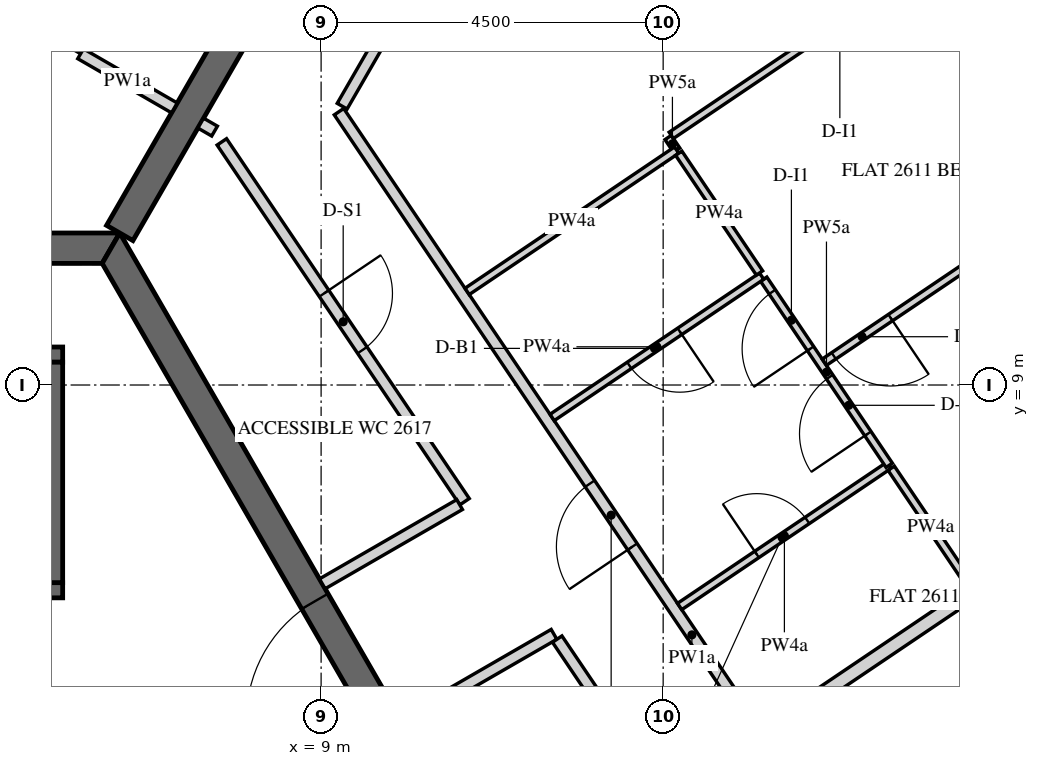
"""IFC4 building model, lengths in metres.
Left out: names, types, materials, properties, quantities, classifications, styles, units other than length and angle.
Written with IfcOpenShell. Run it as: python <this file> out.ifc"""

import sys

from ifc_helpers import new_model, si_unit, direction, frame, frame_2d, origin, place, context, subcontext, project, spatial, polyline, rectangle, outline, extrude, element, fill, save


model = new_model("IFC4")
c1 = context("Model", 3, precision=1e-05, world=origin(), true_north=direction((0.0, 1.0)))
c2 = subcontext(c1, "Body", "Model", "MODEL_VIEW")
j1 = project(units=[si_unit("LENGTHUNIT", "METRE"), si_unit("PLANEANGLEUNIT", "RADIAN")], contexts=[c1])
p1 = place(None, origin())
s1 = spatial("IfcSite", under=j1, at=p1, CompositionType="ELEMENT")
p2 = place(p1, origin())
s2 = spatial("IfcBuilding", under=s1, at=p2, CompositionType="ELEMENT")
p3 = place(p2, frame((0.0, 0.0, 334.2)))
s3 = spatial("IfcBuildingStorey", under=s2, at=p3, CompositionType="ELEMENT", Elevation=334.2)
p4 = place(p3, frame((26.706, 2.879, -0.15), z_axis=(0.0, 0.0, 1.0), x_axis=(-0.559197891507, 0.829034208061, 0.0)))
e1 = element("IfcWall", 1, at=p4, inside=s3, PredefinedType="SOLIDWALL", context=c2, shape_type="SweptSolid", body=[
    extrude(outline(polyline([(0.25, -0.25), (22.795, -0.25), (23.295, 0.25), (-0.25, 0.25), (0.25, -0.25)])), origin(), (0.0, 0.0, 1.0), 3.75),
])
p5 = place(p4, frame((1.323, 0.0, 1.05)))
e2 = element("IfcOpeningElement", 2, at=p5, cuts=e1, PredefinedType="OPENING", context=c2, shape_type="SweptSolid", body=[
    extrude(rectangle(XDim=0.9, YDim=1.5, at=frame_2d((0.45, 0.75))), frame((0.0, 0.26, 0.0), z_axis=(0.0, -1.0, 0.0), x_axis=(1.0, 0.0, 0.0)), (0.0, 0.0, 1.0), 0.52),
])
p6 = place(p4, frame((2.522, 0.0, 0.15)))
e3 = element("IfcOpeningElement", 3, at=p6, cuts=e1, PredefinedType="OPENING", context=c2, shape_type="SweptSolid", body=[
    extrude(rectangle(XDim=1.2, YDim=2.4, at=frame_2d((0.6, 1.2))), frame((0.0, 0.26, 0.0), z_axis=(0.0, -1.0, 0.0), x_axis=(1.0, 0.0, 0.0)), (0.0, 0.0, 1.0), 0.52),
])
p7 = place(p4, frame((4.922, 0.0, 1.05)))
e4 = element("IfcOpeningElement", 4, at=p7, cuts=e1, PredefinedType="OPENING", context=c2, shape_type="SweptSolid", body=[
    extrude(rectangle(XDim=0.9, YDim=1.5, at=frame_2d((0.45, 0.75))), frame((0.0, 0.26, 0.0), z_axis=(0.0, -1.0, 0.0), x_axis=(1.0, 0.0, 0.0)), (0.0, 0.0, 1.0), 0.52),
])
p8 = place(p4, frame((6.122, 0.0, 0.15)))
e5 = element("IfcOpeningElement", 5, at=p8, cuts=e1, PredefinedType="OPENING", context=c2, shape_type="SweptSolid", body=[
    extrude(rectangle(XDim=1.2, YDim=2.4, at=frame_2d((0.6, 1.2))), frame((0.0, 0.26, 0.0), z_axis=(0.0, -1.0, 0.0), x_axis=(1.0, 0.0, 0.0)), (0.0, 0.0, 1.0), 0.52),
])
p9 = place(p4, frame((8.522, 0.0, 1.05)))
e6 = element("IfcOpeningElement", 6, at=p9, cuts=e1, PredefinedType="OPENING", context=c2, shape_type="SweptSolid", body=[
    extrude(rectangle(XDim=0.9, YDim=1.5, at=frame_2d((0.45, 0.75))), frame((0.0, 0.26, 0.0), z_axis=(0.0, -1.0, 0.0), x_axis=(1.0, 0.0, 0.0)), (0.0, 0.0, 1.0), 0.52),
])
p10 = place(p4, frame((9.722, 0.0, 0.15)))
e7 = element("IfcOpeningElement", 7, at=p10, cuts=e1, PredefinedType="OPENING", context=c2, shape_type="SweptSolid", body=[
    extrude(rectangle(XDim=1.2, YDim=2.4, at=frame_2d((0.6, 1.2))), frame((0.0, 0.26, 0.0), z_axis=(0.0, -1.0, 0.0), x_axis=(1.0, 0.0, 0.0)), (0.0, 0.0, 1.0), 0.52),
])
p11 = place(p4, frame((12.122, 0.0, 1.05)))
e8 = element("IfcOpeningElement", 8, at=p11, cuts=e1, PredefinedType="OPENING", context=c2, shape_type="SweptSolid", body=[
    extrude(rectangle(XDim=0.9, YDim=1.5, at=frame_2d((0.45, 0.75))), frame((0.0, 0.26, 0.0), z_axis=(0.0, -1.0, 0.0), x_axis=(1.0, 0.0, 0.0)), (0.0, 0.0, 1.0), 0.52),
])
p12 = place(p4, frame((13.323, 0.0, 0.15)))
e9 = element("IfcOpeningElement", 9, at=p12, cuts=e1, PredefinedType="OPENING", context=c2, shape_type="SweptSolid", body=[
    extrude(rectangle(XDim=1.2, YDim=2.4, at=frame_2d((0.6, 1.2))), frame((0.0, 0.26, 0.0), z_axis=(0.0, -1.0, 0.0), x_axis=(1.0, 0.0, 0.0)), (0.0, 0.0, 1.0), 0.52),
])
p13 = place(p4, frame((15.722, 0.0, 1.05)))
e10 = element("IfcOpeningElement", 10, at=p13, cuts=e1, PredefinedType="OPENING", context=c2, shape_type="SweptSolid", body=[
    extrude(rectangle(XDim=0.9, YDim=1.5, at=frame_2d((0.45, 0.75))), frame((0.0, 0.26, 0.0), z_axis=(0.0, -1.0, 0.0), x_axis=(1.0, 0.0, 0.0)), (0.0, 0.0, 1.0), 0.52),
])
p14 = place(p4, frame((16.922, 0.0, 0.15)))
e11 = element("IfcOpeningElement", 11, at=p14, cuts=e1, PredefinedType="OPENING", context=c2, shape_type="SweptSolid", body=[
    extrude(rectangle(XDim=1.2, YDim=2.4, at=frame_2d((0.6, 1.2))), frame((0.0, 0.26, 0.0), z_axis=(0.0, -1.0, 0.0), x_axis=(1.0, 0.0, 0.0)), (0.0, 0.0, 1.0), 0.52),
])
p15 = place(p4, frame((19.323, 0.0, 1.05)))
e12 = element("IfcOpeningElement", 12, at=p15, cuts=e1, PredefinedType="OPENING", context=c2, shape_type="SweptSolid", body=[
    extrude(rectangle(XDim=0.9, YDim=1.5, at=frame_2d((0.45, 0.75))), frame((0.0, 0.26, 0.0), z_axis=(0.0, -1.0, 0.0), x_axis=(1.0, 0.0, 0.0)), (0.0, 0.0, 1.0), 0.52),
])
p16 = place(p4, frame((20.522, 0.0, 0.15)))
e13 = element("IfcOpeningElement", 13, at=p16, cuts=e1, PredefinedType="OPENING", context=c2, shape_type="SweptSolid", body=[
    extrude(rectangle(XDim=1.2, YDim=2.4, at=frame_2d((0.6, 1.2))), frame((0.0, 0.26, 0.0), z_axis=(0.0, -1.0, 0.0), x_axis=(1.0, 0.0, 0.0)), (0.0, 0.0, 1.0), 0.52),
])
p17 = place(p3, frame((12.471, 0.0, -0.15), z_axis=(0.0, 0.0, 1.0), x_axis=(-0.499996419489, 0.866027470984, 0.0)))
e14 = element("IfcWall", 14, at=p17, inside=s3, PredefinedType="SHEAR", context=c2, shape_type="SweptSolid", body=[
    extrude(outline(polyline([(-0.115, -0.2), (12.586, -0.2), (12.355, 0.2), (0.115, 0.2), (-0.115, -0.2)])), origin(), (0.0, 0.0, 1.0), 3.75),
])
p18 = place(p17, frame((5.306, 0.0, 0.15)))
e15 = element("IfcOpeningElement", 15, at=p18, cuts=e14, PredefinedType="OPENING", context=c2, shape_type="SweptSolid", body=[
    extrude(rectangle(XDim=1.8, YDim=2.4, at=frame_2d((0.9, 1.2))), frame((0.0, 0.21, 0.0), z_axis=(0.0, -1.0, 0.0), x_axis=(1.0, 0.0, 0.0)), (0.0, 0.0, 1.0), 0.42),
])
p19 = place(p3, frame((6.235, 10.8, -0.15), z_axis=(0.0, 0.0, 1.0), x_axis=(-1.0, 0.0, 0.0)))
e16 = element("IfcWall", 16, at=p19, inside=s3, PredefinedType="SHEAR", context=c2, shape_type="SweptSolid", body=[
    extrude(outline(polyline([(-0.115, -0.2), (12.586, -0.2), (12.355, 0.2), (0.115, 0.2), (-0.115, -0.2)])), origin(), (0.0, 0.0, 1.0), 3.75),
])
p20 = place(p3, frame((6.351, 11.0, -0.15), z_axis=(0.0, 0.0, 1.0), x_axis=(0.499998894578, 0.866026041999, 0.0)))
e17 = element("IfcWall", 17, at=p20, inside=s3, PredefinedType="SHEAR", context=c2, shape_type="SweptSolid", body=[
    extrude(rectangle(XDim=15.544, YDim=0.4, at=frame_2d((7.772, 0.0))), origin(), (0.0, 0.0, 1.0), 3.75),
])
p21 = place(p20, frame((6.872, 0.0, 0.15)))
e18 = element("IfcOpeningElement", 18, at=p21, cuts=e17, PredefinedType="OPENING", context=c2, shape_type="SweptSolid", body=[
    extrude(rectangle(XDim=1.8, YDim=2.4, at=frame_2d((0.9, 1.2))), frame((0.0, 0.21, 0.0), z_axis=(0.0, -1.0, 0.0), x_axis=(1.0, 0.0, 0.0)), (0.0, 0.0, 1.0), 0.42),
])
p22 = place(p3, frame((-5.6, 6.3, -0.25), z_axis=(0.0, 0.0, 1.0), x_axis=(1.0, 0.0, 0.0)))
e19 = element("IfcWall", 19, at=p22, inside=s3, PredefinedType="SHEAR", context=c2, shape_type="SweptSolid", body=[
    extrude(rectangle(XDim=11.2, YDim=0.2, at=frame_2d((5.6, 0.0))), origin(), (0.0, 0.0, 1.0), 3.9),
])
p23 = place(p22, frame((8.45, 0.0, 0.25)))
e20 = element("IfcOpeningElement", 20, at=p23, cuts=e19, PredefinedType="OPENING", context=c2, shape_type="SweptSolid", body=[
    extrude(rectangle(XDim=0.9, YDim=2.1, at=frame_2d((0.45, 1.05))), frame((0.0, 0.11, 0.0), z_axis=(0.0, -1.0, 0.0), x_axis=(1.0, 0.0, 0.0)), (0.0, 0.0, 1.0), 0.22),
])
p24 = place(p22, frame((0.65, 0.0, 0.25)))
e21 = element("IfcOpeningElement", 21, at=p24, cuts=e19, PredefinedType="OPENING", context=c2, shape_type="SweptSolid", body=[
    extrude(rectangle(XDim=1.1, YDim=2.1, at=frame_2d((0.55, 1.05))), frame((0.0, 0.11, 0.0), z_axis=(0.0, -1.0, 0.0), x_axis=(1.0, 0.0, 0.0)), (0.0, 0.0, 1.0), 0.22),
])
p25 = place(p22, frame((2.85, 0.0, 0.25)))
e22 = element("IfcOpeningElement", 22, at=p25, cuts=e19, PredefinedType="OPENING", context=c2, shape_type="SweptSolid", body=[
    extrude(rectangle(XDim=1.1, YDim=2.1, at=frame_2d((0.55, 1.05))), frame((0.0, 0.11, 0.0), z_axis=(0.0, -1.0, 0.0), x_axis=(1.0, 0.0, 0.0)), (0.0, 0.0, 1.0), 0.22),
])
p26 = place(p22, frame((5.05, 0.0, 0.25)))
e23 = element("IfcOpeningElement", 23, at=p26, cuts=e19, PredefinedType="OPENING", context=c2, shape_type="SweptSolid", body=[
    extrude(rectangle(XDim=1.1, YDim=2.1, at=frame_2d((0.55, 1.05))), frame((0.0, 0.11, 0.0), z_axis=(0.0, -1.0, 0.0), x_axis=(1.0, 0.0, 0.0)), (0.0, 0.0, 1.0), 0.22),
])
p27 = place(p3, frame((-5.6, 9.4, -0.25), z_axis=(0.0, 0.0, 1.0), x_axis=(1.0, 0.0, 0.0)))
e24 = element("IfcWall", 24, at=p27, inside=s3, PredefinedType="SHEAR", context=c2, shape_type="SweptSolid", body=[
    extrude(rectangle(XDim=11.2, YDim=0.2, at=frame_2d((5.6, 0.0))), origin(), (0.0, 0.0, 1.0), 3.9),
])
p28 = place(p3, frame((5.5, 6.4, -0.25), z_axis=(0.0, 0.0, 1.0), x_axis=(0.0, 1.0, 0.0)))
e25 = element("IfcWall", 25, at=p28, inside=s3, PredefinedType="SHEAR", context=c2, shape_type="SweptSolid", body=[
    extrude(rectangle(XDim=2.9, YDim=0.2, at=frame_2d((1.45, 0.0))), origin(), (0.0, 0.0, 1.0), 3.9),
])
p29 = place(p3, frame((6.244, 14.215, 0.0), z_axis=(0.0, 0.0, 1.0), x_axis=(-0.499998034377, -0.866026538634, 0.0)))
e26 = element("IfcWall", 26, at=p29, inside=s3, PredefinedType="PARTITIONING", context=c2, shape_type="SweptSolid", body=[
    extrude(rectangle(XDim=0.946, YDim=0.15, at=frame_2d((0.473, 0.0))), origin(), (0.0, 0.0, 1.0), 2.838),
])
p30 = place(p3, frame((5.836, 13.358, 0.0), z_axis=(0.0, 0.0, 1.0), x_axis=(0.865988727248, -0.500063520245, 0.0)))
e27 = element("IfcWall", 27, at=p30, inside=s3, PredefinedType="PARTITIONING", context=c2, shape_type="SweptSolid", body=[
    extrude(rectangle(XDim=1.425, YDim=0.15, at=frame_2d((0.712, 0.0))), origin(), (0.0, 0.0, 1.0), 2.838),
])
p31 = place(p3, frame((18.521, -1.171, 0.0), z_axis=(0.0, 0.0, 1.0), x_axis=(-0.559191021435, 0.829038842001, 0.0)))
e28 = element("IfcWall", 28, at=p31, inside=s3, PredefinedType="PARTITIONING", context=c2, shape_type="SweptSolid", body=[
    extrude(rectangle(XDim=16.605, YDim=0.15, at=frame_2d((8.303, 0.0))), origin(), (0.0, 0.0, 1.0), 2.838),
])
p32 = place(p31, frame((9.703, 0.0, 0.0)))
e29 = element("IfcOpeningElement", 29, at=p32, cuts=e28, PredefinedType="OPENING", context=c2, shape_type="SweptSolid", body=[
    extrude(rectangle(XDim=1.0, YDim=2.1, at=frame_2d((0.5, 1.05))), frame((0.0, 0.085, 0.0), z_axis=(0.0, -1.0, 0.0), x_axis=(1.0, 0.0, 0.0)), (0.0, 0.0, 1.0), 0.17),
])
p33 = place(p3, frame((9.277, 12.668, 0.0), z_axis=(0.0, 0.0, 1.0), x_axis=(0.499991012162, 0.866030592853, 0.0)))
e30 = element("IfcWall", 30, at=p33, inside=s3, PredefinedType="PARTITIONING", context=c2, shape_type="SweptSolid", body=[
    extrude(rectangle(XDim=7.764, YDim=0.15, at=frame_2d((3.882, 0.0))), origin(), (0.0, 0.0, 1.0), 2.838),
])
p34 = place(p3, frame((10.066, 4.566, 0.0), z_axis=(0.0, 0.0, 1.0), x_axis=(0.866034075723, 0.499984979461, 0.0)))
e31 = element("IfcWall", 31, at=p34, inside=s3, PredefinedType="PARTITIONING", context=c2, shape_type="SweptSolid", body=[
    extrude(rectangle(XDim=2.308, YDim=0.15, at=frame_2d((1.154, 0.0))), origin(), (0.0, 0.0, 1.0), 2.838),
])
p35 = place(p3, frame((12.106, 5.657, 0.0), z_axis=(0.0, 0.0, 1.0), x_axis=(0.559202573837, -0.829031049728, 0.0)))
e32 = element("IfcWall", 32, at=p35, inside=s3, PredefinedType="PARTITIONING", context=c2, shape_type="SweptSolid", body=[
    extrude(rectangle(XDim=8.394, YDim=0.15, at=frame_2d((4.197, 0.0))), origin(), (0.0, 0.0, 1.0), 2.838),
])
p36 = place(p35, frame((3.747, 0.0, 0.0)))
e33 = element("IfcOpeningElement", 33, at=p36, cuts=e32, PredefinedType="OPENING", context=c2, shape_type="SweptSolid", body=[
    extrude(rectangle(XDim=0.9, YDim=2.1, at=frame_2d((0.45, 1.05))), frame((0.0, 0.085, 0.0), z_axis=(0.0, -1.0, 0.0), x_axis=(1.0, 0.0, 0.0)), (0.0, 0.0, 1.0), 0.17),
])
p37 = place(p3, frame((7.416, 12.446, 0.0), z_axis=(0.0, 0.0, 1.0), x_axis=(0.866378867349, -0.499387282788, 0.0)))
e34 = element("IfcWall", 34, at=p37, inside=s3, PredefinedType="PARTITIONING", context=c2, shape_type="SweptSolid", body=[
    extrude(rectangle(XDim=0.21, YDim=0.15, at=frame_2d((0.105, 0.0))), origin(), (0.0, 0.0, 1.0), 2.838),
])
p38 = place(p3, frame((7.694, 12.199, 0.0), z_axis=(0.0, 0.0, 1.0), x_axis=(0.55920112739, -0.829032025392, 0.0)))
e35 = element("IfcWall", 35, at=p38, inside=s3, PredefinedType="PARTITIONING", context=c2, shape_type="SweptSolid", body=[
    extrude(rectangle(XDim=5.71, YDim=0.15, at=frame_2d((2.855, 0.0))), origin(), (0.0, 0.0, 1.0), 2.838),
])
p39 = place(p38, frame((2.405, 0.0, 0.0)))
e36 = element("IfcOpeningElement", 36, at=p39, cuts=e35, PredefinedType="OPENING", context=c2, shape_type="SweptSolid", body=[
    extrude(rectangle(XDim=0.9, YDim=2.1, at=frame_2d((0.45, 1.05))), frame((0.0, 0.085, 0.0), z_axis=(0.0, -1.0, 0.0), x_axis=(1.0, 0.0, 0.0)), (0.0, 0.0, 1.0), 0.17),
])
p40 = place(p3, frame((10.822, 7.427, 0.0), z_axis=(0.0, 0.0, 1.0), x_axis=(-0.866016009309, -0.500016271356, 0.0)))
e37 = element("IfcWall", 37, at=p40, inside=s3, PredefinedType="PARTITIONING", context=c2, shape_type="SweptSolid", body=[
    extrude(rectangle(XDim=2.086, YDim=0.15, at=frame_2d((1.043, 0.0))), origin(), (0.0, 0.0, 1.0), 2.838),
])
p41 = place(p3, frame((22.069, 9.307, 0.0), z_axis=(0.0, 0.0, 1.0), x_axis=(-0.829040270775, -0.559188903174, 0.0)))
e38 = element("IfcWall", 38, at=p41, inside=s3, PredefinedType="PARTITIONING", context=c2, shape_type="SweptSolid", body=[
    extrude(rectangle(XDim=8.758, YDim=0.18, at=frame_2d((4.379, 0.0))), origin(), (0.0, 0.0, 1.0), 2.838),
])
p42 = place(p3, frame((13.678, 12.089, 0.0), z_axis=(0.0, 0.0, 1.0), x_axis=(-0.559431350648, 0.828876688001, 0.0)))
e39 = element("IfcWall", 39, at=p42, inside=s3, PredefinedType="PARTITIONING", context=c2, shape_type="SweptSolid", body=[
    extrude(rectangle(XDim=0.202, YDim=0.1, at=frame_2d((0.101, 0.0))), origin(), (0.0, 0.0, 1.0), 2.838),
])
p43 = place(p3, frame((13.607, 12.284, 0.0), z_axis=(0.0, 0.0, 1.0), x_axis=(0.829033261565, 0.559199294722, 0.0)))
e40 = element("IfcWall", 40, at=p43, inside=s3, PredefinedType="PARTITIONING", context=c2, shape_type="SweptSolid", body=[
    extrude(rectangle(XDim=5.35, YDim=0.1, at=frame_2d((2.675, 0.0))), origin(), (0.0, 0.0, 1.0), 2.838),
])
p44 = place(p43, frame((2.225, 0.0, 0.0)))
e41 = element("IfcOpeningElement", 41, at=p44, cuts=e40, PredefinedType="OPENING", context=c2, shape_type="SweptSolid", body=[
    extrude(rectangle(XDim=0.9, YDim=2.1, at=frame_2d((0.45, 1.05))), frame((0.0, 0.06, 0.0), z_axis=(0.0, -1.0, 0.0), x_axis=(1.0, 0.0, 0.0)), (0.0, 0.0, 1.0), 0.12),
])
p45 = place(p3, frame((10.921, 10.231, 0.0), z_axis=(0.0, 0.0, 1.0), x_axis=(0.829010378124, 0.559233218759, 0.0)))
e42 = element("IfcWall", 42, at=p45, inside=s3, PredefinedType="PARTITIONING", context=c2, shape_type="SweptSolid", body=[
    extrude(rectangle(XDim=3.325, YDim=0.1, at=frame_2d((1.663, 0.0))), origin(), (0.0, 0.0, 1.0), 2.838),
])
p46 = place(p3, frame((13.717, 6.086, 0.0), z_axis=(0.0, 0.0, 1.0), x_axis=(0.829067379225, 0.559148710725, 0.0)))
e43 = element("IfcWall", 43, at=p46, inside=s3, PredefinedType="PARTITIONING", context=c2, shape_type="SweptSolid", body=[
    extrude(rectangle(XDim=3.325, YDim=0.1, at=frame_2d((1.663, 0.0))), origin(), (0.0, 0.0, 1.0), 2.838),
])
p47 = place(p46, frame((1.225, 0.0, 0.0)))
e44 = element("IfcOpeningElement", 44, at=p47, cuts=e43, PredefinedType="OPENING", context=c2, shape_type="SweptSolid", body=[
    extrude(rectangle(XDim=0.8, YDim=2.1, at=frame_2d((0.4, 1.05))), frame((0.0, 0.06, 0.0), z_axis=(0.0, -1.0, 0.0), x_axis=(1.0, 0.0, 0.0)), (0.0, 0.0, 1.0), 0.12),
])
p48 = place(p3, frame((16.474, 7.944, 0.0), z_axis=(0.0, 0.0, 1.0), x_axis=(-0.559193191328, 0.829037378393, 0.0)))
e45 = element("IfcWall", 45, at=p48, inside=s3, PredefinedType="PARTITIONING", context=c2, shape_type="SweptSolid", body=[
    extrude(rectangle(XDim=2.954, YDim=0.1, at=frame_2d((1.477, 0.0))), origin(), (0.0, 0.0, 1.0), 2.838),
])
p49 = place(p48, frame((0.502, 0.0, 0.0)))
e46 = element("IfcOpeningElement", 46, at=p49, cuts=e45, PredefinedType="OPENING", context=c2, shape_type="SweptSolid", body=[
    extrude(rectangle(XDim=0.9, YDim=2.1, at=frame_2d((0.45, 1.05))), frame((0.0, 0.06, 0.0), z_axis=(0.0, -1.0, 0.0), x_axis=(1.0, 0.0, 0.0)), (0.0, 0.0, 1.0), 0.12),
])
p50 = place(p48, frame((1.852, 0.0, 0.0)))
e47 = element("IfcOpeningElement", 47, at=p50, cuts=e45, PredefinedType="OPENING", context=c2, shape_type="SweptSolid", body=[
    extrude(rectangle(XDim=0.9, YDim=2.1, at=frame_2d((0.45, 1.05))), frame((0.0, 0.06, 0.0), z_axis=(0.0, -1.0, 0.0), x_axis=(1.0, 0.0, 0.0)), (0.0, 0.0, 1.0), 0.12),
])
p51 = place(p3, frame((14.796, 10.433, 0.0), z_axis=(0.0, 0.0, 1.0), x_axis=(-0.82903334026, -0.559199178055, 0.0)))
e48 = element("IfcWall", 48, at=p51, inside=s3, PredefinedType="PARTITIONING", context=c2, shape_type="SweptSolid", body=[
    extrude(rectangle(XDim=3.325, YDim=0.1, at=frame_2d((1.663, 0.0))), origin(), (0.0, 0.0, 1.0), 2.838),
])
p52 = place(p51, frame((1.3, 0.0, 0.0)))
e49 = element("IfcOpeningElement", 49, at=p52, cuts=e48, PredefinedType="OPENING", context=c2, shape_type="SweptSolid", body=[
    extrude(rectangle(XDim=0.8, YDim=2.1, at=frame_2d((0.4, 1.05))), frame((0.0, 0.06, 0.0), z_axis=(0.0, -1.0, 0.0), x_axis=(1.0, 0.0, 0.0)), (0.0, 0.0, 1.0), 0.12),
])
p53 = place(p3, frame((17.541, 6.362, 0.0), z_axis=(0.0, 0.0, 1.0), x_axis=(-0.559110227504, 0.829093332201, 0.0)))
e50 = element("IfcWall", 50, at=p53, inside=s3, PredefinedType="PARTITIONING", context=c2, shape_type="SweptSolid", body=[
    extrude(rectangle(XDim=1.862, YDim=0.1, at=frame_2d((0.931, 0.0))), origin(), (0.0, 0.0, 1.0), 2.838),
])
p54 = place(p3, frame((20.055, 12.292, 0.0), z_axis=(0.0, 0.0, 1.0), x_axis=(-0.829033261565, -0.559199294722, 0.0)))
e51 = element("IfcWall", 51, at=p54, inside=s3, PredefinedType="PARTITIONING", context=c2, shape_type="SweptSolid", body=[
    extrude(rectangle(XDim=5.35, YDim=0.1, at=frame_2d((2.675, 0.0))), origin(), (0.0, 0.0, 1.0), 2.838),
])
p55 = place(p54, frame((4.3, 0.0, 0.0)))
e52 = element("IfcOpeningElement", 52, at=p55, cuts=e51, PredefinedType="OPENING", context=c2, shape_type="SweptSolid", body=[
    extrude(rectangle(XDim=0.9, YDim=2.1, at=frame_2d((0.45, 1.05))), frame((0.0, 0.06, 0.0), z_axis=(0.0, -1.0, 0.0), x_axis=(1.0, 0.0, 0.0)), (0.0, 0.0, 1.0), 0.12),
])
p56 = place(p3, frame((13.705, 12.049, 0.0), z_axis=(0.0, 0.0, 1.0), x_axis=(0.559199178055, -0.82903334026, 0.0)))
e53 = element("IfcWall", 53, at=p56, inside=s3, PredefinedType="PARTITIONING", context=c2, shape_type="SweptSolid", body=[
    extrude(rectangle(XDim=1.9, YDim=0.1, at=frame_2d((0.95, 0.0))), origin(), (0.0, 0.0, 1.0), 2.838),
])
p57 = place(p18, origin())
e54 = element("IfcDoor", 54, at=p57, inside=s3, OperationType="DOUBLE_DOOR_SINGLE_SWING", PredefinedType="DOOR", context=c2, shape_type="SweptSolid", body=[
    extrude(rectangle(XDim=1.8, YDim=2.4, at=frame_2d((0.9, 1.2))), frame((0.0, 0.025, 0.0), z_axis=(0.0, -1.0, 0.0), x_axis=(1.0, 0.0, 0.0)), (0.0, 0.0, 1.0), 0.05),
])
fill(e15, e54)
p58 = place(p32, origin())
e55 = element("IfcDoor", 55, at=p58, inside=s3, OperationType="SINGLE_SWING_RIGHT", PredefinedType="DOOR", context=c2, shape_type="SweptSolid", body=[
    extrude(rectangle(XDim=1.0, YDim=2.1, at=frame_2d((0.5, 1.05))), frame((0.0, 0.025, 0.0), z_axis=(0.0, -1.0, 0.0), x_axis=(1.0, 0.0, 0.0)), (0.0, 0.0, 1.0), 0.05),
])
fill(e29, e55)
p59 = place(p47, origin())
e56 = element("IfcDoor", 56, at=p59, inside=s3, OperationType="SINGLE_SWING_RIGHT", PredefinedType="DOOR", context=c2, shape_type="SweptSolid", body=[
    extrude(rectangle(XDim=0.8, YDim=2.1, at=frame_2d((0.4, 1.05))), frame((0.0, 0.025, 0.0), z_axis=(0.0, -1.0, 0.0), x_axis=(1.0, 0.0, 0.0)), (0.0, 0.0, 1.0), 0.05),
])
fill(e44, e56)
p60 = place(p49, origin())
e57 = element("IfcDoor", 57, at=p60, inside=s3, OperationType="SINGLE_SWING_LEFT", PredefinedType="DOOR", context=c2, shape_type="SweptSolid", body=[
    extrude(rectangle(XDim=0.9, YDim=2.1, at=frame_2d((0.45, 1.05))), frame((0.0, 0.025, 0.0), z_axis=(0.0, -1.0, 0.0), x_axis=(1.0, 0.0, 0.0)), (0.0, 0.0, 1.0), 0.05),
])
fill(e46, e57)
p61 = place(p55, origin())
e58 = element("IfcDoor", 58, at=p61, inside=s3, OperationType="SINGLE_SWING_RIGHT", PredefinedType="DOOR", context=c2, shape_type="SweptSolid", body=[
    extrude(rectangle(XDim=0.9, YDim=2.1, at=frame_2d((0.45, 1.05))), frame((0.0, 0.025, 0.0), z_axis=(0.0, -1.0, 0.0), x_axis=(1.0, 0.0, 0.0)), (0.0, 0.0, 1.0), 0.05),
])
fill(e52, e58)
p62 = place(p50, origin())
e59 = element("IfcDoor", 59, at=p62, inside=s3, OperationType="SINGLE_SWING_RIGHT", PredefinedType="DOOR", context=c2, shape_type="SweptSolid", body=[
    extrude(rectangle(XDim=0.9, YDim=2.1, at=frame_2d((0.45, 1.05))), frame((0.0, 0.025, 0.0), z_axis=(0.0, -1.0, 0.0), x_axis=(1.0, 0.0, 0.0)), (0.0, 0.0, 1.0), 0.05),
])
fill(e47, e59)
p63 = place(p52, origin())
e60 = element("IfcDoor", 60, at=p63, inside=s3, OperationType="SINGLE_SWING_LEFT", PredefinedType="DOOR", context=c2, shape_type="SweptSolid", body=[
    extrude(rectangle(XDim=0.8, YDim=2.1, at=frame_2d((0.4, 1.05))), frame((0.0, 0.025, 0.0), z_axis=(0.0, -1.0, 0.0), x_axis=(1.0, 0.0, 0.0)), (0.0, 0.0, 1.0), 0.05),
])
fill(e49, e60)
p64 = place(p39, origin())
e61 = element("IfcDoor", 61, at=p64, inside=s3, OperationType="SINGLE_SWING_RIGHT", PredefinedType="DOOR", context=c2, shape_type="SweptSolid", body=[
    extrude(rectangle(XDim=0.9, YDim=2.1, at=frame_2d((0.45, 1.05))), frame((0.0, 0.025, 0.0), z_axis=(0.0, -1.0, 0.0), x_axis=(1.0, 0.0, 0.0)), (0.0, 0.0, 1.0), 0.05),
])
fill(e36, e61)
save(model, sys.argv[1])
